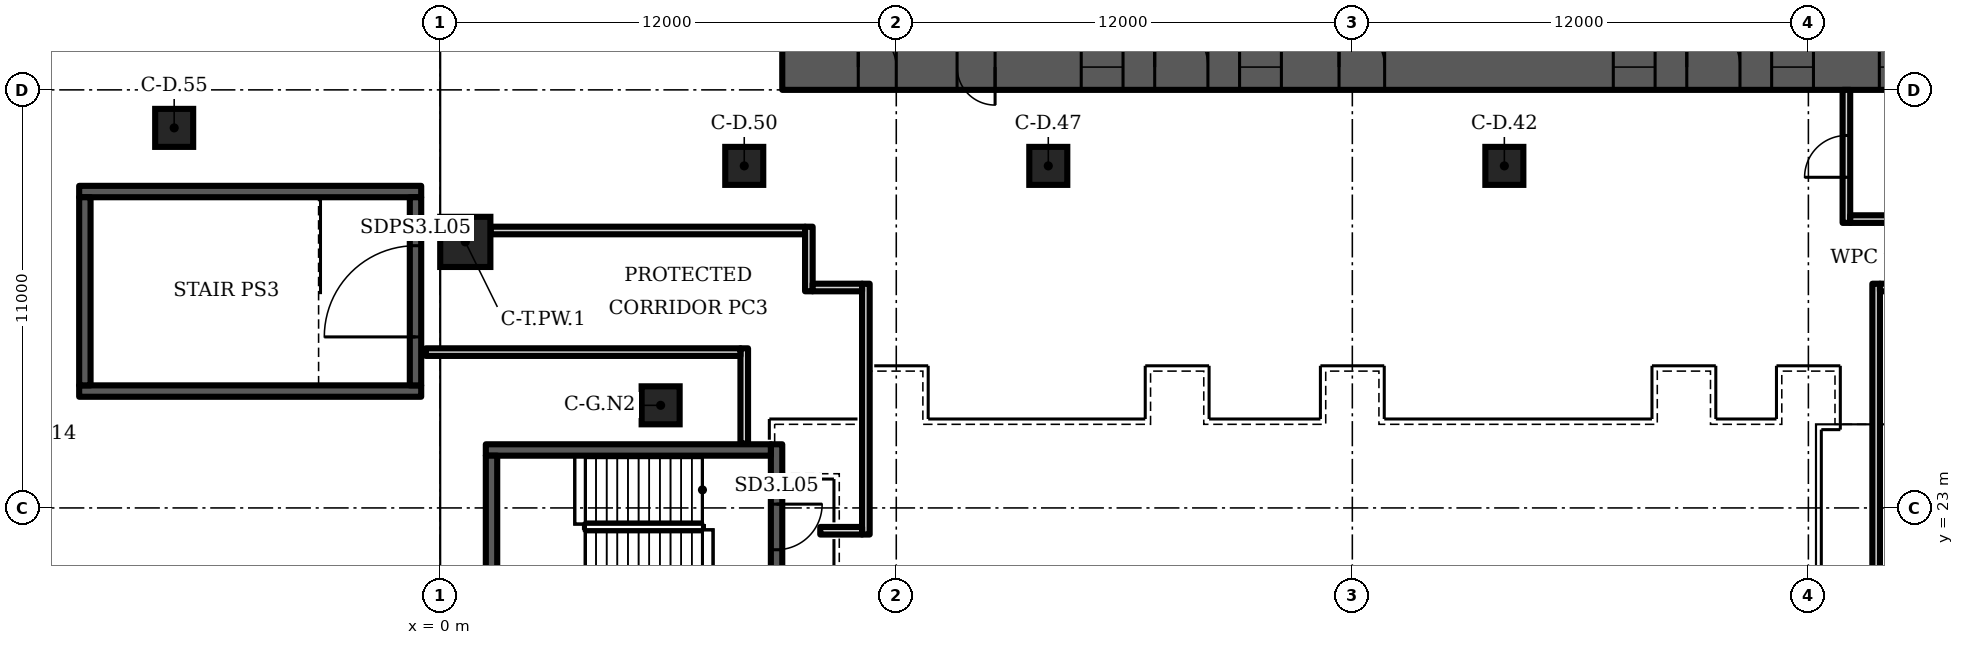
"""IFC4 building model, lengths in metres.
Left out: names, types, materials, properties, quantities, classifications, styles, units other than length and angle.
Written with IfcOpenShell. Run it as: python <this file> out.ifc"""

import sys

from ifc_helpers import new_model, si_unit, direction, frame, frame_2d, origin, origin_2d, place, context, subcontext, project, spatial, rectangle, extrude, element, fill, save


model = new_model("IFC4")
c1 = context("Model", 3, precision=1e-05, world=origin(), true_north=direction((0.0, 1.0)))
c2 = subcontext(c1, "Body", "Model", "MODEL_VIEW")
j1 = project(units=[si_unit("LENGTHUNIT", "METRE"), si_unit("PLANEANGLEUNIT", "RADIAN")], contexts=[c1])
p1 = place(None, origin())
s1 = spatial("IfcSite", under=j1, at=p1, CompositionType="ELEMENT")
p2 = place(p1, origin())
s2 = spatial("IfcBuilding", under=s1, at=p2, CompositionType="ELEMENT")
p3 = place(p2, frame((0.0, 0.0, 33.0)))
s3 = spatial("IfcBuildingStorey", under=s2, at=p3, CompositionType="ELEMENT", Elevation=33.0)
p4 = place(p3, frame((0.66, 30.0, 0.0), z_axis=(0.0, 0.0, 1.0), x_axis=(1.0, 0.0, 0.0)))
e1 = element("IfcColumn", 1, at=p4, inside=s3, PredefinedType="COLUMN", context=c2, shape_type="SweptSolid", body=[
    extrude(rectangle(XDim=1.32, YDim=1.32, at=origin_2d()), origin(), (0.0, 0.0, 1.0), 8.5),
])
for number, where, z_axis, x_axis in (
    (2, (5.8, 25.7, 0.0), (0.0, 0.0, 1.0), (1.0, 0.0, 0.0)),
    (3, (28.0, 32.0, 0.0), (0.0, 0.0, 1.0), (1.0, 0.0, 0.0)),
    (4, (16.0, 32.0, 0.0), (0.0, 0.0, 1.0), (1.0, 0.0, 0.0)),
    (5, (8.0, 32.0, 0.0), (0.0, 0.0, 1.0), (1.0, 0.0, 0.0)),
    (6, (-7.0, 33.0, 0.0), (0.0, 0.0, 1.0), (1.0, 0.0, 0.0)),
):
    element("IfcColumn", number, at=place(p3, frame(where, z_axis=z_axis, x_axis=x_axis)), inside=s3, PredefinedType="COLUMN", context=c2, shape_type="SweptSolid", body=[
        extrude(rectangle(XDim=1.0, YDim=1.0, at=origin_2d()), origin(), (0.0, 0.0, 1.0), 8.5),
    ])
p5 = place(p3, frame((9.0, 34.6, 0.0), z_axis=(0.0, 0.0, 1.0), x_axis=(1.0, 0.0, 0.0)))
e7 = element("IfcWall", 7, at=p5, inside=s3, PredefinedType="SHEAR", context=c2, shape_type="SweptSolid", body=[
    extrude(rectangle(XDim=56.0, YDim=1.2, at=frame_2d((28.0, 0.0))), origin(), (0.0, 0.0, 1.0), 8.1),
])
p6 = place(p5, frame((2.0, 0.0, 0.0)))
e8 = element("IfcOpeningElement", 8, at=p6, cuts=e7, PredefinedType="OPENING", context=c2, shape_type="SweptSolid", body=[
    extrude(rectangle(XDim=1.0, YDim=2.1, at=frame_2d((0.5, 1.05))), frame((0.0, 0.61, 0.0), z_axis=(0.0, -1.0, 0.0), x_axis=(1.0, 0.0, 0.0)), (0.0, 0.0, 1.0), 1.22),
])
p7 = place(p5, frame((4.6, 0.0, 0.0)))
e9 = element("IfcOpeningElement", 9, at=p7, cuts=e7, PredefinedType="OPENING", context=c2, shape_type="SweptSolid", body=[
    extrude(rectangle(XDim=1.0, YDim=2.1, at=frame_2d((0.5, 1.05))), frame((0.0, 0.61, 0.0), z_axis=(0.0, -1.0, 0.0), x_axis=(1.0, 0.0, 0.0)), (0.0, 0.0, 1.0), 1.22),
])
p8 = place(p5, frame((7.867, 0.0, 0.0)))
e10 = element("IfcOpeningElement", 10, at=p8, cuts=e7, PredefinedType="OPENING", context=c2, shape_type="SweptSolid", body=[
    extrude(rectangle(XDim=1.1, YDim=2.1, at=frame_2d((0.55, 1.05))), frame((0.0, 0.61, 0.0), z_axis=(0.0, -1.0, 0.0), x_axis=(1.0, 0.0, 0.0)), (0.0, 0.0, 1.0), 1.22),
])
p9 = place(p5, frame((12.033, 0.0, 0.0)))
e11 = element("IfcOpeningElement", 11, at=p9, cuts=e7, PredefinedType="OPENING", context=c2, shape_type="SweptSolid", body=[
    extrude(rectangle(XDim=1.1, YDim=2.1, at=frame_2d((0.55, 1.05))), frame((0.0, 0.61, 0.0), z_axis=(0.0, -1.0, 0.0), x_axis=(1.0, 0.0, 0.0)), (0.0, 0.0, 1.0), 1.22),
])
p10 = place(p5, frame((9.8, 0.0, 0.0)))
e12 = element("IfcOpeningElement", 12, at=p10, cuts=e7, PredefinedType="OPENING", context=c2, shape_type="SweptSolid", body=[
    extrude(rectangle(XDim=1.4, YDim=2.1, at=frame_2d((0.7, 1.05))), frame((0.0, 0.61, 0.0), z_axis=(0.0, -1.0, 0.0), x_axis=(1.0, 0.0, 0.0)), (0.0, 0.0, 1.0), 1.22),
])
p11 = place(p5, frame((14.65, 0.0, 0.0)))
e13 = element("IfcOpeningElement", 13, at=p11, cuts=e7, PredefinedType="OPENING", context=c2, shape_type="SweptSolid", body=[
    extrude(rectangle(XDim=1.2, YDim=2.1, at=frame_2d((0.6, 1.05))), frame((0.0, 0.61, 0.0), z_axis=(0.0, -1.0, 0.0), x_axis=(1.0, 0.0, 0.0)), (0.0, 0.0, 1.0), 1.22),
])
p12 = place(p5, frame((21.867, 0.0, 0.0)))
e14 = element("IfcOpeningElement", 14, at=p12, cuts=e7, PredefinedType="OPENING", context=c2, shape_type="SweptSolid", body=[
    extrude(rectangle(XDim=1.1, YDim=2.1, at=frame_2d((0.55, 1.05))), frame((0.0, 0.61, 0.0), z_axis=(0.0, -1.0, 0.0), x_axis=(1.0, 0.0, 0.0)), (0.0, 0.0, 1.0), 1.22),
])
p13 = place(p5, frame((26.033, 0.0, 0.0)))
e15 = element("IfcOpeningElement", 15, at=p13, cuts=e7, PredefinedType="OPENING", context=c2, shape_type="SweptSolid", body=[
    extrude(rectangle(XDim=1.1, YDim=2.1, at=frame_2d((0.55, 1.05))), frame((0.0, 0.61, 0.0), z_axis=(0.0, -1.0, 0.0), x_axis=(1.0, 0.0, 0.0)), (0.0, 0.0, 1.0), 1.22),
])
p14 = place(p5, frame((23.8, 0.0, 0.0)))
e16 = element("IfcOpeningElement", 16, at=p14, cuts=e7, PredefinedType="OPENING", context=c2, shape_type="SweptSolid", body=[
    extrude(rectangle(XDim=1.4, YDim=2.1, at=frame_2d((0.7, 1.05))), frame((0.0, 0.61, 0.0), z_axis=(0.0, -1.0, 0.0), x_axis=(1.0, 0.0, 0.0)), (0.0, 0.0, 1.0), 1.22),
])
p15 = place(p5, frame((28.867, 0.0, 0.0)))
e17 = element("IfcOpeningElement", 17, at=p15, cuts=e7, PredefinedType="OPENING", context=c2, shape_type="SweptSolid", body=[
    extrude(rectangle(XDim=1.1, YDim=2.1, at=frame_2d((0.55, 1.05))), frame((0.0, 0.61, 0.0), z_axis=(0.0, -1.0, 0.0), x_axis=(1.0, 0.0, 0.0)), (0.0, 0.0, 1.0), 1.22),
])
p16 = place(p5, frame((33.033, 0.0, 0.0)))
e18 = element("IfcOpeningElement", 18, at=p16, cuts=e7, PredefinedType="OPENING", context=c2, shape_type="SweptSolid", body=[
    extrude(rectangle(XDim=1.1, YDim=2.1, at=frame_2d((0.55, 1.05))), frame((0.0, 0.61, 0.0), z_axis=(0.0, -1.0, 0.0), x_axis=(1.0, 0.0, 0.0)), (0.0, 0.0, 1.0), 1.22),
])
p17 = place(p5, frame((40.15, 0.0, 0.0)))
e19 = element("IfcOpeningElement", 19, at=p17, cuts=e7, PredefinedType="OPENING", context=c2, shape_type="SweptSolid", body=[
    extrude(rectangle(XDim=1.2, YDim=2.1, at=frame_2d((0.6, 1.05))), frame((0.0, 0.61, 0.0), z_axis=(0.0, -1.0, 0.0), x_axis=(1.0, 0.0, 0.0)), (0.0, 0.0, 1.0), 1.22),
])
p18 = place(p5, frame((44.8, 0.0, 0.0)))
e20 = element("IfcOpeningElement", 20, at=p18, cuts=e7, PredefinedType="OPENING", context=c2, shape_type="SweptSolid", body=[
    extrude(rectangle(XDim=1.4, YDim=2.1, at=frame_2d((0.7, 1.05))), frame((0.0, 0.61, 0.0), z_axis=(0.0, -1.0, 0.0), x_axis=(1.0, 0.0, 0.0)), (0.0, 0.0, 1.0), 1.22),
])
p19 = place(p5, frame((49.867, 0.0, 0.0)))
e21 = element("IfcOpeningElement", 21, at=p19, cuts=e7, PredefinedType="OPENING", context=c2, shape_type="SweptSolid", body=[
    extrude(rectangle(XDim=1.1, YDim=2.1, at=frame_2d((0.55, 1.05))), frame((0.0, 0.61, 0.0), z_axis=(0.0, -1.0, 0.0), x_axis=(1.0, 0.0, 0.0)), (0.0, 0.0, 1.0), 1.22),
])
p20 = place(p5, frame((53.5, 0.0, 0.0)))
e22 = element("IfcOpeningElement", 22, at=p20, cuts=e7, PredefinedType="OPENING", context=c2, shape_type="SweptSolid", body=[
    extrude(rectangle(XDim=1.1, YDim=2.1, at=frame_2d((0.55, 1.05))), frame((0.0, 0.61, 0.0), z_axis=(0.0, -1.0, 0.0), x_axis=(1.0, 0.0, 0.0)), (0.0, 0.0, 1.0), 1.22),
])
p21 = place(p5, frame((51.567, 0.0, 0.0)))
e23 = element("IfcOpeningElement", 23, at=p21, cuts=e7, PredefinedType="OPENING", context=c2, shape_type="SweptSolid", body=[
    extrude(rectangle(XDim=1.4, YDim=2.1, at=frame_2d((0.7, 1.05))), frame((0.0, 0.61, 0.0), z_axis=(0.0, -1.0, 0.0), x_axis=(1.0, 0.0, 0.0)), (0.0, 0.0, 1.0), 1.22),
])
p22 = place(p3, frame((37.0, 30.5, 0.0), z_axis=(0.0, 0.0, 1.0), x_axis=(0.0, 1.0, 0.0)))
e24 = element("IfcWall", 24, at=p22, inside=s3, PredefinedType="PARTITIONING", context=c2, shape_type="SweptSolid", body=[
    extrude(rectangle(XDim=3.5, YDim=0.2, at=frame_2d((1.75, 0.0))), origin(), (0.0, 0.0, 1.0), 8.1),
])
p23 = place(p22, frame((1.2, 0.0, 0.0)))
e25 = element("IfcOpeningElement", 25, at=p23, cuts=e24, PredefinedType="OPENING", context=c2, shape_type="SweptSolid", body=[
    extrude(rectangle(XDim=1.1, YDim=2.1, at=frame_2d((0.55, 1.05))), frame((0.0, 0.11, 0.0), z_axis=(0.0, -1.0, 0.0), x_axis=(1.0, 0.0, 0.0)), (0.0, 0.0, 1.0), 0.22),
])
p24 = place(p3, frame((37.1, 30.6, 0.0), z_axis=(0.0, 0.0, 1.0), x_axis=(1.0, 0.0, 0.0)))
e26 = element("IfcWall", 26, at=p24, inside=s3, PredefinedType="PARTITIONING", context=c2, shape_type="SweptSolid", body=[
    extrude(rectangle(XDim=2.8, YDim=0.2, at=frame_2d((1.4, 0.0))), origin(), (0.0, 0.0, 1.0), 8.1),
])
p25 = place(p3, frame((8.85, 20.325, 0.0), z_axis=(0.0, 0.0, 1.0), x_axis=(0.0, 1.0, 0.0)))
e27 = element("IfcWall", 27, at=p25, inside=s3, PredefinedType="SHEAR", context=c2, shape_type="SweptSolid", body=[
    extrude(rectangle(XDim=4.35, YDim=0.3, at=frame_2d((2.175, 0.0))), origin(), (0.0, 0.0, 1.0), 8.1),
])
p26 = place(p25, frame((1.575, 0.0, 0.0)))
e28 = element("IfcOpeningElement", 28, at=p26, cuts=e27, PredefinedType="OPENING", context=c2, shape_type="SweptSolid", body=[
    extrude(rectangle(XDim=1.2, YDim=2.1, at=frame_2d((0.6, 1.05))), frame((0.0, 0.16, 0.0), z_axis=(0.0, -1.0, 0.0), x_axis=(1.0, 0.0, 0.0)), (0.0, 0.0, 1.0), 0.32),
])
for number, where, z_axis, x_axis in (
    (29, (-9.5, 26.075, 0.0), (0.0, 0.0, 1.0), (1.0, 0.0, 0.0)),
    (30, (-9.5, 31.325, 0.0), (0.0, 0.0, 1.0), (1.0, 0.0, 0.0)),
):
    element("IfcWall", number, at=place(p3, frame(where, z_axis=z_axis, x_axis=x_axis)), inside=s3, PredefinedType="SHEAR", context=c2, shape_type="SweptSolid", body=[
        extrude(rectangle(XDim=9.0, YDim=0.3, at=frame_2d((4.5, 0.0))), origin(), (0.0, 0.0, 1.0), 8.1),
    ])
p27 = place(p3, frame((-9.35, 26.225, 0.0), z_axis=(0.0, 0.0, 1.0), x_axis=(0.0, 1.0, 0.0)))
e31 = element("IfcWall", 31, at=p27, inside=s3, PredefinedType="SHEAR", context=c2, shape_type="SweptSolid", body=[
    extrude(rectangle(XDim=4.95, YDim=0.3, at=frame_2d((2.475, 0.0))), origin(), (0.0, 0.0, 1.0), 8.1),
])
p28 = place(p3, frame((-0.65, 26.225, 0.0), z_axis=(0.0, 0.0, 1.0), x_axis=(0.0, 1.0, 0.0)))
e32 = element("IfcWall", 32, at=p28, inside=s3, PredefinedType="SHEAR", context=c2, shape_type="SweptSolid", body=[
    extrude(rectangle(XDim=4.95, YDim=0.3, at=frame_2d((2.475, 0.0))), origin(), (0.0, 0.0, 1.0), 8.1),
])
p29 = place(p28, frame((1.275, 0.0, 0.0)))
e33 = element("IfcOpeningElement", 33, at=p29, cuts=e32, PredefinedType="OPENING", context=c2, shape_type="SweptSolid", body=[
    extrude(rectangle(XDim=2.4, YDim=2.1, at=frame_2d((1.2, 1.05))), frame((0.0, 0.16, 0.0), z_axis=(0.0, -1.0, 0.0), x_axis=(1.0, 0.0, 0.0)), (0.0, 0.0, 1.0), 0.32),
])
p30 = place(p3, frame((11.2, 22.3, 0.0), z_axis=(0.0, 0.0, 1.0), x_axis=(0.0, 1.0, 0.0)))
e34 = element("IfcWall", 34, at=p30, inside=s3, PredefinedType="PARTITIONING", context=c2, shape_type="SweptSolid", body=[
    extrude(rectangle(XDim=6.6, YDim=0.2, at=frame_2d((3.3, 0.0))), origin(), (0.0, 0.0, 1.0), 8.1),
])
p31 = place(p3, frame((10.0, 22.4, 0.0), z_axis=(0.0, 0.0, 1.0), x_axis=(1.0, 0.0, 0.0)))
e35 = element("IfcWall", 35, at=p31, inside=s3, PredefinedType="PARTITIONING", context=c2, shape_type="SweptSolid", body=[
    extrude(rectangle(XDim=1.1, YDim=0.2, at=frame_2d((0.55, 0.0))), origin(), (0.0, 0.0, 1.0), 8.1),
])
p32 = place(p3, frame((8.0, 24.695, 0.0), z_axis=(0.0, 0.0, 1.0), x_axis=(0.0, 1.0, 0.0)))
e36 = element("IfcWall", 36, at=p32, inside=s3, PredefinedType="PARTITIONING", context=c2, shape_type="SweptSolid", body=[
    extrude(rectangle(XDim=2.505, YDim=0.2, at=frame_2d((1.252, 0.0))), origin(), (0.0, 0.0, 1.0), 8.1),
])
p33 = place(p3, frame((-0.38, 27.1, 0.0), z_axis=(0.0, 0.0, 1.0), x_axis=(1.0, 0.0, 0.0)))
e37 = element("IfcWall", 37, at=p33, inside=s3, PredefinedType="PARTITIONING", context=c2, shape_type="SweptSolid", body=[
    extrude(rectangle(XDim=8.28, YDim=0.2, at=frame_2d((4.14, 0.0))), origin(), (0.0, 0.0, 1.0), 8.1),
])
p34 = place(p3, frame((1.33, 30.3, 0.0), z_axis=(0.0, 0.0, 1.0), x_axis=(1.0, 0.0, 0.0)))
e38 = element("IfcWall", 38, at=p34, inside=s3, PredefinedType="PARTITIONING", context=c2, shape_type="SweptSolid", body=[
    extrude(rectangle(XDim=8.27, YDim=0.2, at=frame_2d((4.135, 0.0))), origin(), (0.0, 0.0, 1.0), 8.1),
])
p35 = place(p3, frame((9.7, 28.7, 0.0), z_axis=(0.0, 0.0, 1.0), x_axis=(0.0, 1.0, 0.0)))
e39 = element("IfcWall", 39, at=p35, inside=s3, PredefinedType="PARTITIONING", context=c2, shape_type="SweptSolid", body=[
    extrude(rectangle(XDim=1.7, YDim=0.2, at=frame_2d((0.85, 0.0))), origin(), (0.0, 0.0, 1.0), 8.1),
])
p36 = place(p3, frame((9.8, 28.8, 0.0), z_axis=(0.0, 0.0, 1.0), x_axis=(1.0, 0.0, 0.0)))
e40 = element("IfcWall", 40, at=p36, inside=s3, PredefinedType="PARTITIONING", context=c2, shape_type="SweptSolid", body=[
    extrude(rectangle(XDim=1.3, YDim=0.2, at=frame_2d((0.65, 0.0))), origin(), (0.0, 0.0, 1.0), 8.1),
])
p37 = place(p3, frame((37.783, 5.881, 0.0), z_axis=(0.0, 0.0, 1.0), x_axis=(0.0, 1.0, 0.0)))
e41 = element("IfcWall", 41, at=p37, inside=s3, PredefinedType="PARTITIONING", context=c2, shape_type="SweptSolid", body=[
    extrude(rectangle(XDim=23.019, YDim=0.2, at=frame_2d((11.509, 0.0))), origin(), (0.0, 0.0, 1.0), 8.1),
])
p38 = place(p3, frame((37.883, 28.8, 0.0), z_axis=(0.0, 0.0, 1.0), x_axis=(1.0, 0.0, 0.0)))
e42 = element("IfcWall", 42, at=p38, inside=s3, PredefinedType="PARTITIONING", context=c2, shape_type="SweptSolid", body=[
    extrude(rectangle(XDim=1.3, YDim=0.2, at=frame_2d((0.65, 0.0))), origin(), (0.0, 0.0, 1.0), 8.1),
])
p39 = place(p3, frame((1.2, 24.525, 0.0), z_axis=(0.0, 0.0, 1.0), x_axis=(1.0, 0.0, 0.0)))
e43 = element("IfcWall", 43, at=p39, inside=s3, PredefinedType="SHEAR", context=c2, shape_type="SweptSolid", body=[
    extrude(rectangle(XDim=7.5, YDim=0.3, at=frame_2d((3.75, 0.0))), origin(), (0.0, 0.0, 1.0), 8.1),
])
p40 = place(p3, frame((1.35, 20.625, 0.0), z_axis=(0.0, 0.0, 1.0), x_axis=(0.0, 1.0, 0.0)))
e44 = element("IfcWall", 44, at=p40, inside=s3, PredefinedType="SHEAR", context=c2, shape_type="SweptSolid", body=[
    extrude(rectangle(XDim=3.75, YDim=0.3, at=frame_2d((1.875, 0.0))), origin(), (0.0, 0.0, 1.0), 8.1),
])
p41 = place(p6, origin())
e45 = element("IfcDoor", 45, at=p41, inside=s3, OperationType="SINGLE_SWING_LEFT", PredefinedType="DOOR", context=c2, shape_type="SweptSolid", body=[
    extrude(rectangle(XDim=1.0, YDim=2.1, at=frame_2d((0.5, 1.05))), frame((0.0, 0.6, 0.0), z_axis=(0.0, -1.0, 0.0), x_axis=(1.0, 0.0, 0.0)), (0.0, 0.0, 1.0), 1.199),
])
fill(e8, e45)
p42 = place(p7, origin())
e46 = element("IfcDoor", 46, at=p42, inside=s3, OperationType="SINGLE_SWING_RIGHT", PredefinedType="DOOR", context=c2, shape_type="SweptSolid", body=[
    extrude(rectangle(XDim=1.0, YDim=2.1, at=frame_2d((0.5, 1.05))), frame((0.0, 0.6, 0.0), z_axis=(0.0, -1.0, 0.0), x_axis=(1.0, 0.0, 0.0)), (0.0, 0.0, 1.0), 1.199),
])
fill(e9, e46)
p43 = place(p8, origin())
e47 = element("IfcDoor", 47, at=p43, inside=s3, OperationType="DOUBLE_DOOR_SLIDING", PredefinedType="DOOR", context=c2, shape_type="SweptSolid", body=[
    extrude(rectangle(XDim=1.1, YDim=2.1, at=frame_2d((0.55, 1.05))), frame((0.0, 0.025, 0.0), z_axis=(0.0, -1.0, 0.0), x_axis=(1.0, 0.0, 0.0)), (0.0, 0.0, 1.0), 0.05),
])
fill(e10, e47)
p44 = place(p9, origin())
e48 = element("IfcDoor", 48, at=p44, inside=s3, OperationType="DOUBLE_DOOR_SLIDING", PredefinedType="DOOR", context=c2, shape_type="SweptSolid", body=[
    extrude(rectangle(XDim=1.1, YDim=2.1, at=frame_2d((0.55, 1.05))), frame((0.0, 0.025, 0.0), z_axis=(0.0, -1.0, 0.0), x_axis=(1.0, 0.0, 0.0)), (0.0, 0.0, 1.0), 0.05),
])
fill(e11, e48)
p45 = place(p10, origin())
e49 = element("IfcDoor", 49, at=p45, inside=s3, OperationType="DOUBLE_DOOR_SINGLE_SWING", PredefinedType="DOOR", context=c2, shape_type="SweptSolid", body=[
    extrude(rectangle(XDim=1.4, YDim=2.1, at=frame_2d((0.7, 1.05))), frame((0.0, 0.025, 0.0), z_axis=(0.0, -1.0, 0.0), x_axis=(1.0, 0.0, 0.0)), (0.0, 0.0, 1.0), 0.05),
])
fill(e12, e49)
p46 = place(p11, origin())
e50 = element("IfcDoor", 50, at=p46, inside=s3, OperationType="SINGLE_SWING_LEFT", PredefinedType="DOOR", context=c2, shape_type="SweptSolid", body=[
    extrude(rectangle(XDim=1.2, YDim=2.1, at=frame_2d((0.6, 1.05))), frame((0.0, 0.025, 0.0), z_axis=(0.0, -1.0, 0.0), x_axis=(1.0, 0.0, 0.0)), (0.0, 0.0, 1.0), 0.05),
])
fill(e13, e50)
p47 = place(p12, origin())
e51 = element("IfcDoor", 51, at=p47, inside=s3, OperationType="DOUBLE_DOOR_SLIDING", PredefinedType="DOOR", context=c2, shape_type="SweptSolid", body=[
    extrude(rectangle(XDim=1.1, YDim=2.1, at=frame_2d((0.55, 1.05))), frame((0.0, 0.025, 0.0), z_axis=(0.0, -1.0, 0.0), x_axis=(1.0, 0.0, 0.0)), (0.0, 0.0, 1.0), 0.05),
])
fill(e14, e51)
p48 = place(p13, origin())
e52 = element("IfcDoor", 52, at=p48, inside=s3, OperationType="DOUBLE_DOOR_SLIDING", PredefinedType="DOOR", context=c2, shape_type="SweptSolid", body=[
    extrude(rectangle(XDim=1.1, YDim=2.1, at=frame_2d((0.55, 1.05))), frame((0.0, 0.025, 0.0), z_axis=(0.0, -1.0, 0.0), x_axis=(1.0, 0.0, 0.0)), (0.0, 0.0, 1.0), 0.05),
])
fill(e15, e52)
p49 = place(p14, origin())
e53 = element("IfcDoor", 53, at=p49, inside=s3, OperationType="DOUBLE_DOOR_SINGLE_SWING", PredefinedType="DOOR", context=c2, shape_type="SweptSolid", body=[
    extrude(rectangle(XDim=1.4, YDim=2.1, at=frame_2d((0.7, 1.05))), frame((0.0, 0.025, 0.0), z_axis=(0.0, -1.0, 0.0), x_axis=(1.0, 0.0, 0.0)), (0.0, 0.0, 1.0), 0.05),
])
fill(e16, e53)
p50 = place(p15, origin())
e54 = element("IfcDoor", 54, at=p50, inside=s3, OperationType="DOUBLE_DOOR_SLIDING", PredefinedType="DOOR", context=c2, shape_type="SweptSolid", body=[
    extrude(rectangle(XDim=1.1, YDim=2.1, at=frame_2d((0.55, 1.05))), frame((0.0, 0.025, 0.0), z_axis=(0.0, -1.0, 0.0), x_axis=(1.0, 0.0, 0.0)), (0.0, 0.0, 1.0), 0.05),
])
fill(e17, e54)
p51 = place(p23, origin())
e55 = element("IfcDoor", 55, at=p51, inside=s3, OperationType="SINGLE_SWING_LEFT", PredefinedType="DOOR", context=c2, shape_type="SweptSolid", body=[
    extrude(rectangle(XDim=1.1, YDim=2.1, at=frame_2d((0.55, 1.05))), frame((0.0, 0.025, 0.0), z_axis=(0.0, -1.0, 0.0), x_axis=(1.0, 0.0, 0.0)), (0.0, 0.0, 1.0), 0.05),
])
fill(e25, e55)
p52 = place(p26, origin())
e56 = element("IfcDoor", 56, at=p52, inside=s3, OperationType="SINGLE_SWING_RIGHT", PredefinedType="DOOR", context=c2, shape_type="SweptSolid", body=[
    extrude(rectangle(XDim=1.2, YDim=2.1, at=frame_2d((0.6, 1.05))), frame((0.0, 0.025, 0.0), z_axis=(0.0, -1.0, 0.0), x_axis=(1.0, 0.0, 0.0)), (0.0, 0.0, 1.0), 0.05),
])
fill(e28, e56)
p53 = place(p29, origin())
e57 = element("IfcDoor", 57, at=p53, inside=s3, OperationType="DOUBLE_DOOR_SINGLE_SWING", PredefinedType="DOOR", context=c2, shape_type="SweptSolid", body=[
    extrude(rectangle(XDim=2.4, YDim=2.1, at=frame_2d((1.2, 1.05))), frame((0.0, 0.025, 0.0), z_axis=(0.0, -1.0, 0.0), x_axis=(1.0, 0.0, 0.0)), (0.0, 0.0, 1.0), 0.05),
])
fill(e33, e57)
save(model, sys.argv[1])
